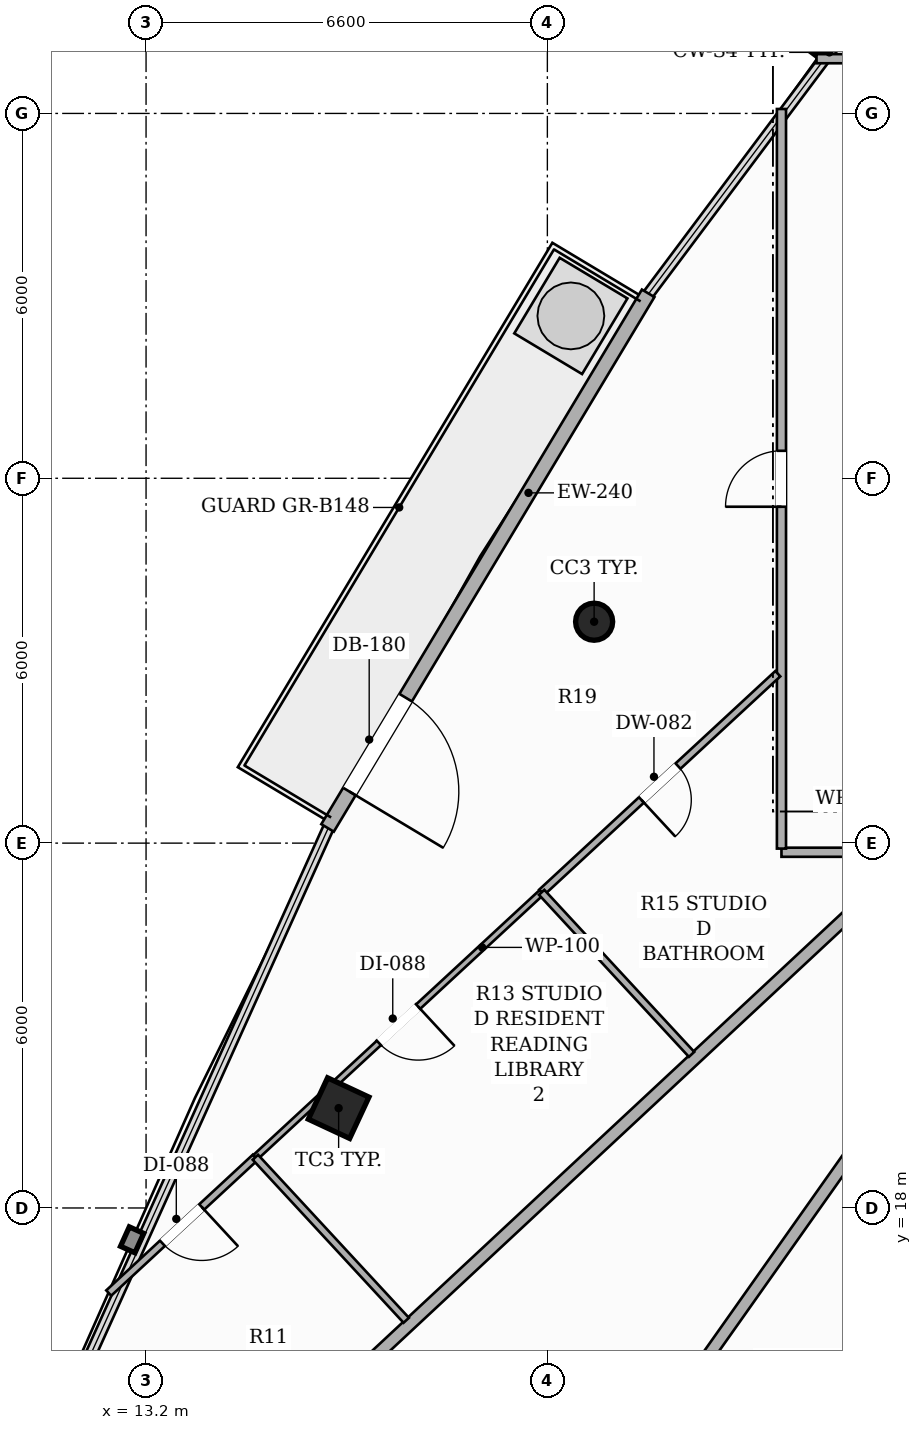
"""IFC4 building model, lengths in metres.
Left out: names, types, materials, properties, quantities, classifications, styles, units other than length and angle.
Written with IfcOpenShell. Run it as: python <this file> out.ifc"""

import sys

from ifc_helpers import new_model, si_unit, direction, frame, frame_2d, origin, origin_2d, place, context, subcontext, project, spatial, rectangle, hollow_rectangle, hollow_circle, extrude, element, fill, save


model = new_model("IFC4")
c1 = context("Model", 3, precision=1e-05, world=origin(), true_north=direction((0.0, 1.0)))
c2 = subcontext(c1, "Body", "Model", "MODEL_VIEW")
j1 = project(units=[si_unit("LENGTHUNIT", "METRE"), si_unit("PLANEANGLEUNIT", "RADIAN")], contexts=[c1])
p1 = place(None, origin())
s1 = spatial("IfcSite", under=j1, at=p1, CompositionType="ELEMENT")
p2 = place(p1, origin())
s2 = spatial("IfcBuilding", under=s1, at=p2, CompositionType="ELEMENT")
p3 = place(p2, frame((0.0, 0.0, 219.5)))
s3 = spatial("IfcBuildingStorey", under=s2, at=p3, CompositionType="ELEMENT", Elevation=219.5)
p4 = place(p3, frame((20.569, 27.641, 0.0), z_axis=(0.0, 0.0, 1.0), x_axis=(1.0, 0.0, 0.0)))
e1 = element("IfcColumn", 1, at=p4, inside=s3, PredefinedType="COLUMN", context=c2, shape_type="SweptSolid", body=[
    extrude(hollow_circle(Radius=0.305, WallThickness=0.016, at=origin_2d()), origin(), (0.0, 0.0, 1.0), 3.3),
])
p5 = place(p3, frame((16.367, 19.642, 0.0), z_axis=(0.0, 0.0, 1.0), x_axis=(0.422618261741, 0.906307787037, 0.0)))
e2 = element("IfcColumn", 2, at=p5, inside=s3, PredefinedType="COLUMN", context=c2, shape_type="SweptSolid", body=[
    extrude(hollow_rectangle(XDim=0.75, YDim=0.75, WallThickness=0.025, at=origin_2d()), origin(), (0.0, 0.0, 1.0), 3.3),
])
p6 = place(p3, frame((21.458, 33.042, 0.0), z_axis=(0.0, 0.0, 1.0), x_axis=(-0.51433465168, -0.857589567381, 0.0)))
e3 = element("IfcWall", 3, at=p6, inside=s3, PredefinedType="SOLIDWALL", context=c2, shape_type="SweptSolid", body=[
    extrude(rectangle(XDim=10.252, YDim=0.24, at=frame_2d((5.126, 0.0))), origin(), (0.0, 0.0, 1.0), 2.624),
])
p7 = place(p6, frame((7.754, 0.0, 0.0)))
e4 = element("IfcOpeningElement", 4, at=p7, cuts=e3, PredefinedType="OPENING", context=c2, shape_type="SweptSolid", body=[
    extrude(rectangle(XDim=1.8, YDim=2.2, at=frame_2d((0.9, 1.1))), frame((0.0, 0.13, 0.0), z_axis=(0.0, -1.0, 0.0), x_axis=(1.0, 0.0, 0.0)), (0.0, 0.0, 1.0), 0.26),
])
p8 = place(p3, frame((32.073, 23.85, 0.0), z_axis=(0.0, 0.0, 1.0), x_axis=(-1.0, 0.0, 0.0)))
e5 = element("IfcWall", 5, at=p8, inside=s3, PredefinedType="PARTITIONING", context=c2, shape_type="SweptSolid", body=[
    extrude(rectangle(XDim=8.423, YDim=0.15, at=frame_2d((4.211, 0.0))), origin(), (0.0, 0.0, 1.0), 2.565),
])
p9 = place(p8, frame((1.601, 0.0, 0.0)))
e6 = element("IfcOpeningElement", 6, at=p9, cuts=e5, PredefinedType="OPENING", context=c2, shape_type="SweptSolid", body=[
    extrude(rectangle(XDim=0.92, YDim=2.15, at=frame_2d((0.46, 1.075))), frame((0.0, 0.085, 0.0), z_axis=(0.0, -1.0, 0.0), x_axis=(1.0, 0.0, 0.0)), (0.0, 0.0, 1.0), 0.17),
])
p10 = place(p8, frame((4.841, 0.0, 0.0)))
e7 = element("IfcOpeningElement", 7, at=p10, cuts=e5, PredefinedType="OPENING", context=c2, shape_type="SweptSolid", body=[
    extrude(rectangle(XDim=0.88, YDim=2.1, at=frame_2d((0.44, 1.05))), frame((0.0, 0.085, 0.0), z_axis=(0.0, -1.0, 0.0), x_axis=(1.0, 0.0, 0.0)), (0.0, 0.0, 1.0), 0.17),
])
p11 = place(p3, frame((23.65, 23.91, 0.0), z_axis=(0.0, 0.0, 1.0), x_axis=(0.0, 1.0, 0.0)))
e8 = element("IfcWall", 8, at=p11, inside=s3, PredefinedType="PARTITIONING", context=c2, shape_type="SweptSolid", body=[
    extrude(rectangle(XDim=12.163, YDim=0.15, at=frame_2d((6.082, 0.0))), origin(), (0.0, 0.0, 1.0), 2.492),
])
p12 = place(p11, frame((5.622, 0.0, 0.0)))
e9 = element("IfcOpeningElement", 9, at=p12, cuts=e8, PredefinedType="OPENING", context=c2, shape_type="SweptSolid", body=[
    extrude(rectangle(XDim=0.92, YDim=2.15, at=frame_2d((0.46, 1.075))), frame((0.0, 0.085, 0.0), z_axis=(0.0, -1.0, 0.0), x_axis=(1.0, 0.0, 0.0)), (0.0, 0.0, 1.0), 0.17),
])
p13 = place(p3, frame((24.226, 36.9, 0.0), z_axis=(0.0, 0.0, 1.0), x_axis=(1.0, 0.0, 0.0)))
e10 = element("IfcWall", 10, at=p13, inside=s3, PredefinedType="PARTITIONING", context=c2, shape_type="SweptSolid", body=[
    extrude(rectangle(XDim=1.924, YDim=0.15, at=frame_2d((0.962, 0.0))), origin(), (0.0, 0.0, 1.0), 2.619),
])
p14 = place(p13, frame((0.502, 0.0, 0.0)))
e11 = element("IfcOpeningElement", 11, at=p14, cuts=e10, PredefinedType="OPENING", context=c2, shape_type="SweptSolid", body=[
    extrude(rectangle(XDim=0.92, YDim=2.15, at=frame_2d((0.46, 1.075))), frame((0.0, 0.085, 0.0), z_axis=(0.0, -1.0, 0.0), x_axis=(1.0, 0.0, 0.0)), (0.0, 0.0, 1.0), 0.17),
])
p15 = place(p3, frame((15.776, 6.132, 0.0), z_axis=(0.0, 0.0, 1.0), x_axis=(0.577200381612, 0.816602546816, 0.0)))
e12 = element("IfcWall", 12, at=p15, inside=s3, PredefinedType="PARTITIONING", context=c2, shape_type="SweptSolid", body=[
    extrude(rectangle(XDim=21.624, YDim=0.2, at=frame_2d((10.812, 0.0))), origin(), (0.0, 0.0, 1.0), 2.492),
])
p16 = place(p3, frame((25.799, 23.79, 0.0), z_axis=(0.0, 0.0, 1.0), x_axis=(-0.731584830333, -0.681750420629, 0.0)))
e13 = element("IfcWall", 13, at=p16, inside=s3, PredefinedType="PARTITIONING", context=c2, shape_type="SweptSolid", body=[
    extrude(rectangle(XDim=21.776, YDim=0.2, at=frame_2d((10.888, 0.0))), origin(), (0.0, 0.0, 1.0), 2.492),
])
p17 = place(p3, frame((23.59, 26.786, 0.0), z_axis=(0.0, 0.0, 1.0), x_axis=(-0.733888422473, -0.679270037143, 0.0)))
e14 = element("IfcWall", 14, at=p17, inside=s3, PredefinedType="PARTITIONING", context=c2, shape_type="SweptSolid", body=[
    extrude(rectangle(XDim=5.292, YDim=0.12, at=frame_2d((2.646, 0.0))), origin(), (0.0, 0.0, 1.0), 3.06),
])
p18 = place(p17, frame((2.236, 0.0, 0.0)))
e15 = element("IfcOpeningElement", 15, at=p18, cuts=e14, PredefinedType="OPENING", context=c2, shape_type="SweptSolid", body=[
    extrude(rectangle(XDim=0.82, YDim=2.1, at=frame_2d((0.41, 1.05))), frame((0.0, 0.07, 0.0), z_axis=(0.0, -1.0, 0.0), x_axis=(1.0, 0.0, 0.0)), (0.0, 0.0, 1.0), 0.14),
])
p19 = place(p3, frame((14.998, 18.834, 0.0), z_axis=(0.0, 0.0, 1.0), x_axis=(-0.733840210512, -0.679322121998, 0.0)))
e16 = element("IfcWall", 16, at=p19, inside=s3, PredefinedType="PARTITIONING", context=c2, shape_type="SweptSolid", body=[
    extrude(rectangle(XDim=3.287, YDim=0.12, at=frame_2d((1.644, 0.0))), origin(), (0.0, 0.0, 1.0), 3.06),
])
p20 = place(p19, frame((1.203, 0.0, 0.0)))
e17 = element("IfcOpeningElement", 17, at=p20, cuts=e16, PredefinedType="OPENING", context=c2, shape_type="SweptSolid", body=[
    extrude(rectangle(XDim=0.88, YDim=2.1, at=frame_2d((0.44, 1.05))), frame((0.0, 0.07, 0.0), z_axis=(0.0, -1.0, 0.0), x_axis=(1.0, 0.0, 0.0)), (0.0, 0.0, 1.0), 0.14),
])
p21 = place(p3, frame((19.706, 23.191, 0.0), z_axis=(0.0, 0.0, 1.0), x_axis=(-0.733941951163, -0.679212199775, 0.0)))
e18 = element("IfcWall", 18, at=p21, inside=s3, PredefinedType="PARTITIONING", context=c2, shape_type="SweptSolid", body=[
    extrude(rectangle(XDim=6.415, YDim=0.1, at=frame_2d((3.208, 0.0))), origin(), (0.0, 0.0, 1.0), 2.492),
])
p22 = place(p21, frame((2.767, 0.0, 0.0)))
e19 = element("IfcOpeningElement", 19, at=p22, cuts=e18, PredefinedType="OPENING", context=c2, shape_type="SweptSolid", body=[
    extrude(rectangle(XDim=0.88, YDim=2.1, at=frame_2d((0.44, 1.05))), frame((0.0, 0.06, 0.0), z_axis=(0.0, -1.0, 0.0), x_axis=(1.0, 0.0, 0.0)), (0.0, 0.0, 1.0), 0.12),
])
p23 = place(p3, frame((22.172, 20.526, 0.0), z_axis=(0.0, 0.0, 1.0), x_axis=(-0.67917603964, 0.733975413198, 0.0)))
e20 = element("IfcWall", 20, at=p23, inside=s3, PredefinedType="PARTITIONING", context=c2, shape_type="SweptSolid", body=[
    extrude(rectangle(XDim=3.631, YDim=0.12, at=frame_2d((1.815, 0.0))), origin(), (0.0, 0.0, 1.0), 2.565),
])
p24 = place(p3, frame((14.998, 18.834, 0.0), z_axis=(0.0, 0.0, 1.0), x_axis=(0.67920675179, -0.733946992856, 0.0)))
e21 = element("IfcWall", 21, at=p24, inside=s3, PredefinedType="PARTITIONING", context=c2, shape_type="SweptSolid", body=[
    extrude(rectangle(XDim=3.653, YDim=0.12, at=frame_2d((1.826, 0.0))), origin(), (0.0, 0.0, 1.0), 2.492),
])
p25 = place(p7, origin())
e22 = element("IfcDoor", 22, at=p25, inside=s3, OperationType="SINGLE_SWING_RIGHT", PredefinedType="DOOR", context=c2, shape_type="SweptSolid", body=[
    extrude(rectangle(XDim=1.8, YDim=2.2, at=frame_2d((0.9, 1.1))), frame((0.0, 0.025, 0.0), z_axis=(0.0, -1.0, 0.0), x_axis=(1.0, 0.0, 0.0)), (0.0, 0.0, 1.0), 0.05),
])
fill(e4, e22)
p26 = place(p12, origin())
e23 = element("IfcDoor", 23, at=p26, inside=s3, OperationType="SINGLE_SWING_LEFT", PredefinedType="DOOR", context=c2, shape_type="SweptSolid", body=[
    extrude(rectangle(XDim=0.92, YDim=2.15, at=frame_2d((0.46, 1.075))), frame((0.0, 0.025, 0.0), z_axis=(0.0, -1.0, 0.0), x_axis=(1.0, 0.0, 0.0)), (0.0, 0.0, 1.0), 0.05),
])
fill(e9, e23)
p27 = place(p18, origin())
e24 = element("IfcDoor", 24, at=p27, inside=s3, OperationType="SINGLE_SWING_RIGHT", PredefinedType="DOOR", context=c2, shape_type="SweptSolid", body=[
    extrude(rectangle(XDim=0.82, YDim=2.1, at=frame_2d((0.41, 1.05))), frame((0.0, 0.025, 0.0), z_axis=(0.0, -1.0, 0.0), x_axis=(1.0, 0.0, 0.0)), (0.0, 0.0, 1.0), 0.05),
])
fill(e15, e24)
p28 = place(p20, origin())
e25 = element("IfcDoor", 25, at=p28, inside=s3, OperationType="SINGLE_SWING_LEFT", PredefinedType="DOOR", context=c2, shape_type="SweptSolid", body=[
    extrude(rectangle(XDim=0.88, YDim=2.1, at=frame_2d((0.44, 1.05))), frame((0.0, 0.025, 0.0), z_axis=(0.0, -1.0, 0.0), x_axis=(1.0, 0.0, 0.0)), (0.0, 0.0, 1.0), 0.05),
])
fill(e17, e25)
p29 = place(p22, origin())
e26 = element("IfcDoor", 26, at=p29, inside=s3, OperationType="SINGLE_SWING_LEFT", PredefinedType="DOOR", context=c2, shape_type="SweptSolid", body=[
    extrude(rectangle(XDim=0.88, YDim=2.1, at=frame_2d((0.44, 1.05))), frame((0.0, 0.025, 0.0), z_axis=(0.0, -1.0, 0.0), x_axis=(1.0, 0.0, 0.0)), (0.0, 0.0, 1.0), 0.05),
])
fill(e19, e26)
save(model, sys.argv[1])
